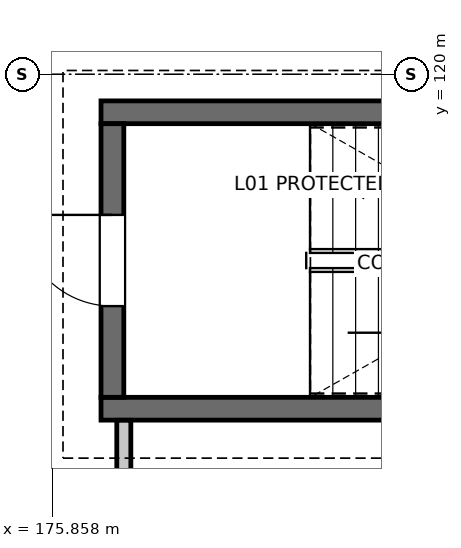
"""IFC4 building model, lengths in metres.
Left out: names, types, materials, properties, quantities, classifications, styles, units other than length and angle.
Written with IfcOpenShell. Run it as: python <this file> out.ifc"""

import sys

from ifc_helpers import new_model, si_unit, direction, frame, frame_2d, origin, place, context, subcontext, project, spatial, rectangle, extrude, element, fill, save


model = new_model("IFC4")
c1 = context("Model", 3, precision=1e-05, world=origin(), true_north=direction((0.0, 1.0)))
c2 = subcontext(c1, "Body", "Model", "MODEL_VIEW")
j1 = project(units=[si_unit("LENGTHUNIT", "METRE"), si_unit("PLANEANGLEUNIT", "RADIAN")], contexts=[c1])
p1 = place(None, origin())
s1 = spatial("IfcSite", under=j1, at=p1, CompositionType="ELEMENT")
p2 = place(p1, origin())
s2 = spatial("IfcBuilding", under=s1, at=p2, CompositionType="ELEMENT")
p3 = place(p2, frame((0.0, 0.0, 5.4)))
s3 = spatial("IfcBuildingStorey", under=s2, at=p3, CompositionType="ELEMENT", Elevation=5.4)
for number, where, z_axis, x_axis in (
    (1, (185.9, 115.6, 0.0), (0.0, 0.0, 1.0), (-1.0, 0.0, 0.0)),
    (2, (176.5, 119.5, 0.0), (0.0, 0.0, 1.0), (1.0, 0.0, 0.0)),
):
    element("IfcWall", number, at=place(p3, frame(where, z_axis=z_axis, x_axis=x_axis)), inside=s3, PredefinedType="SOLIDWALL", context=c2, shape_type="SweptSolid", body=[
        extrude(rectangle(XDim=9.4, YDim=0.3, at=frame_2d((4.7, 0.0))), origin(), (0.0, 0.0, 1.0), 3.67),
    ])
p4 = place(p3, frame((176.65, 115.75, 0.0), z_axis=(0.0, 0.0, 1.0), x_axis=(0.0, 1.0, 0.0)))
e3 = element("IfcWall", 3, at=p4, inside=s3, PredefinedType="SOLIDWALL", context=c2, shape_type="SweptSolid", body=[
    extrude(rectangle(XDim=3.6, YDim=0.3, at=frame_2d((1.8, 0.0))), origin(), (0.0, 0.0, 1.0), 3.67),
])
p5 = place(p4, frame((1.2, 0.0, 0.0)))
e4 = element("IfcOpeningElement", 4, at=p5, cuts=e3, PredefinedType="OPENING", context=c2, shape_type="SweptSolid", body=[
    extrude(rectangle(XDim=1.2, YDim=2.2, at=frame_2d((0.6, 1.1))), frame((0.0, 0.16, 0.0), z_axis=(0.0, -1.0, 0.0), x_axis=(1.0, 0.0, 0.0)), (0.0, 0.0, 1.0), 0.32),
])
p6 = place(p3, frame((176.8, 76.872, 0.0), z_axis=(0.0, 0.0, 1.0), x_axis=(0.0, 1.0, 0.0)))
e5 = element("IfcWall", 5, at=p6, inside=s3, PredefinedType="PARTITIONING", context=c2, shape_type="SweptSolid", body=[
    extrude(rectangle(XDim=38.576, YDim=0.185, at=frame_2d((19.288, 0.0))), origin(), (0.0, 0.0, 1.0), 3.038),
])
p7 = place(p6, frame((18.813, 0.0, 0.0)))
e6 = element("IfcOpeningElement", 6, at=p7, cuts=e5, PredefinedType="OPENING", context=c2, shape_type="SweptSolid", body=[
    extrude(rectangle(XDim=0.95, YDim=2.34, at=frame_2d((0.475, 1.17))), frame((0.0, 0.103, 0.0), z_axis=(0.0, -1.0, 0.0), x_axis=(1.0, 0.0, 0.0)), (0.0, 0.0, 1.0), 0.205),
])
p8 = place(p6, frame((21.013, 0.0, 0.95)))
e7 = element("IfcOpeningElement", 7, at=p8, cuts=e5, PredefinedType="OPENING", context=c2, shape_type="SweptSolid", body=[
    extrude(rectangle(XDim=2.0, YDim=1.45, at=frame_2d((1.0, 0.725))), frame((0.0, 0.103, 0.0), z_axis=(0.0, -1.0, 0.0), x_axis=(1.0, 0.0, 0.0)), (0.0, 0.0, 1.0), 0.205),
])
p9 = place(p5, origin())
e8 = element("IfcDoor", 8, at=p9, inside=s3, OperationType="SINGLE_SWING_RIGHT", PredefinedType="DOOR", context=c2, shape_type="SweptSolid", body=[
    extrude(rectangle(XDim=1.2, YDim=2.2, at=frame_2d((0.6, 1.1))), frame((0.0, 0.025, 0.0), z_axis=(0.0, -1.0, 0.0), x_axis=(1.0, 0.0, 0.0)), (0.0, 0.0, 1.0), 0.05),
])
fill(e4, e8)
save(model, sys.argv[1])
